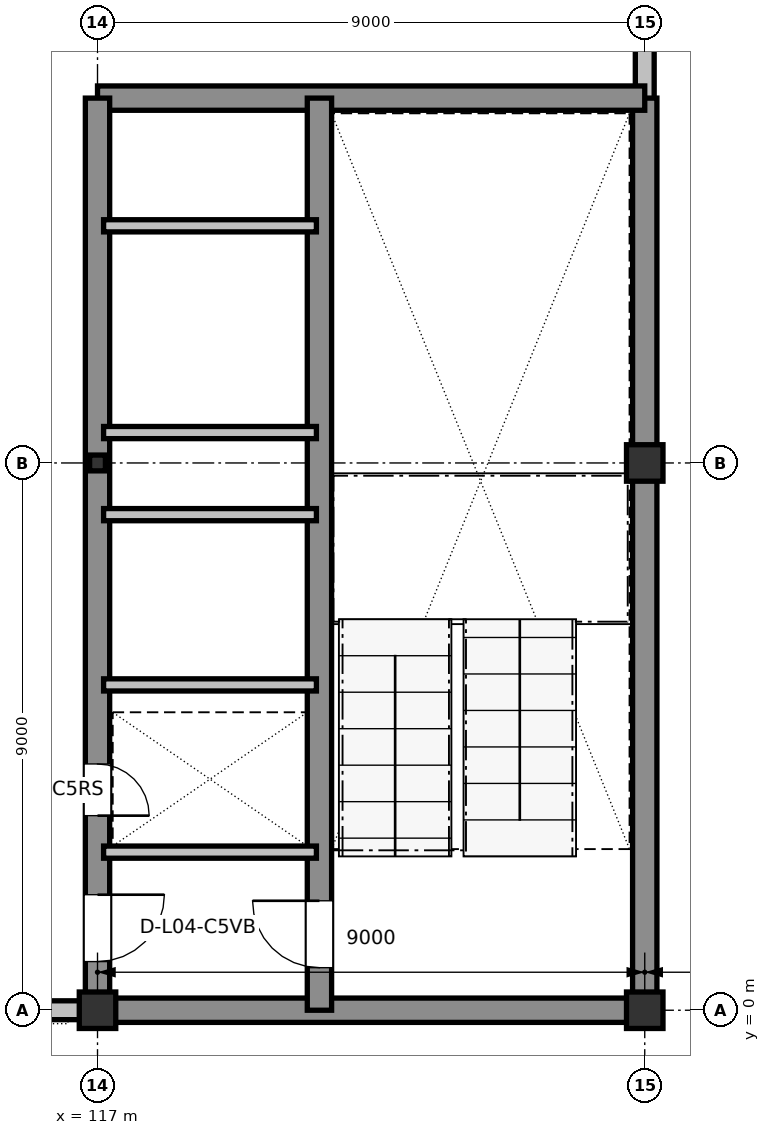
"""IFC4 building model, lengths in metres.
Left out: names, types, materials, properties, quantities, classifications, styles, units other than length and angle.
Written with IfcOpenShell. Run it as: python <this file> out.ifc"""

import sys

from ifc_helpers import new_model, si_unit, direction, frame, frame_2d, origin, origin_2d, place, context, subcontext, project, spatial, rectangle, i_section, extrude, element, fill, save


model = new_model("IFC4")
c1 = context("Model", 3, precision=1e-05, world=origin(), true_north=direction((0.0, 1.0)))
c2 = subcontext(c1, "Body", "Model", "MODEL_VIEW")
j1 = project(units=[si_unit("LENGTHUNIT", "METRE"), si_unit("PLANEANGLEUNIT", "RADIAN")], contexts=[c1])
p1 = place(None, origin())
s1 = spatial("IfcSite", under=j1, at=p1, CompositionType="ELEMENT")
p2 = place(p1, origin())
s2 = spatial("IfcBuilding", under=s1, at=p2, CompositionType="ELEMENT")
p3 = place(p2, frame((0.0, 0.0, 19.2)))
s3 = spatial("IfcBuildingStorey", under=s2, at=p3, CompositionType="ELEMENT", Elevation=19.2)
p4 = place(p3, frame((117.0, 0.0, 0.0), z_axis=(0.0, 0.0, 1.0), x_axis=(1.0, 0.0, 0.0)))
e1 = element("IfcColumn", 1, at=p4, inside=s3, PredefinedType="COLUMN", context=c2, shape_type="SweptSolid", body=[
    extrude(rectangle(XDim=0.6, YDim=0.6, at=origin_2d()), origin(), (0.0, 0.0, 1.0), 4.2),
])
p5 = place(p3, frame((117.0, 9.0, 0.0), z_axis=(0.0, 0.0, 1.0), x_axis=(1.0, 0.0, 0.0)))
e2 = element("IfcColumn", 2, at=p5, inside=s3, PredefinedType="COLUMN", context=c2, shape_type="SweptSolid", body=[
    extrude(i_section(OverallWidth=0.26, OverallDepth=0.26, WebThickness=0.01, FlangeThickness=0.018, at=origin_2d()), origin(), (0.0, 0.0, 1.0), 4.2),
])
for number, where, z_axis, x_axis in (
    (3, (126.0, 0.0, 0.0), (0.0, 0.0, 1.0), (1.0, 0.0, 0.0)),
    (4, (126.0, 9.0, 0.0), (0.0, 0.0, 1.0), (1.0, 0.0, 0.0)),
):
    element("IfcColumn", number, at=place(p3, frame(where, z_axis=z_axis, x_axis=x_axis)), inside=s3, PredefinedType="COLUMN", context=c2, shape_type="SweptSolid", body=[
        extrude(rectangle(XDim=0.6, YDim=0.6, at=origin_2d()), origin(), (0.0, 0.0, 1.0), 4.2),
    ])
p6 = place(p3, frame((108.285, 0.0, 0.0), z_axis=(0.0, 0.0, 1.0), x_axis=(1.0, 0.0, 0.0)))
e5 = element("IfcWall", 5, at=p6, inside=s3, PredefinedType="STANDARD", context=c2, shape_type="SweptSolid", body=[
    extrude(rectangle(XDim=8.43, YDim=0.31, at=frame_2d((4.215, 0.0))), origin(), (0.0, 0.0, 1.0), 3.635),
])
p7 = place(p6, frame((3.365, 0.0, 0.9)))
e6 = element("IfcOpeningElement", 6, at=p7, cuts=e5, PredefinedType="OPENING", context=c2, shape_type="SweptSolid", body=[
    extrude(rectangle(XDim=1.7, YDim=2.05, at=frame_2d((0.85, 1.025))), frame((0.0, 0.165, 0.0), z_axis=(0.0, -1.0, 0.0), x_axis=(1.0, 0.0, 0.0)), (0.0, 0.0, 1.0), 0.33),
])
p8 = place(p3, frame((126.0, 14.925, 0.0), z_axis=(0.0, 0.0, 1.0), x_axis=(0.0, 1.0, 0.0)))
e7 = element("IfcWall", 7, at=p8, inside=s3, PredefinedType="STANDARD", context=c2, shape_type="SweptSolid", body=[
    extrude(rectangle(XDim=2.79, YDim=0.31, at=frame_2d((1.395, 0.0))), origin(), (0.0, 0.0, 1.0), 3.655),
])
p9 = place(p3, frame((117.0, 0.0, 0.0), z_axis=(0.0, 0.0, 1.0), x_axis=(1.0, 0.0, 0.0)))
e8 = element("IfcWall", 8, at=p9, inside=s3, PredefinedType="SHEAR", context=c2, shape_type="SweptSolid", body=[
    extrude(rectangle(XDim=9.0, YDim=0.4, at=frame_2d((4.5, 0.0))), origin(), (0.0, 0.0, 1.0), 3.96),
])
p10 = place(p3, frame((126.0, 0.0, 0.0), z_axis=(0.0, 0.0, 1.0), x_axis=(0.0, 1.0, 0.0)))
e9 = element("IfcWall", 9, at=p10, inside=s3, PredefinedType="SHEAR", context=c2, shape_type="SweptSolid", body=[
    extrude(rectangle(XDim=15.0, YDim=0.4, at=frame_2d((7.5, 0.0))), origin(), (0.0, 0.0, 1.0), 3.96),
])
p11 = place(p3, frame((126.0, 15.0, 0.0), z_axis=(0.0, 0.0, 1.0), x_axis=(-1.0, 0.0, 0.0)))
e10 = element("IfcWall", 10, at=p11, inside=s3, PredefinedType="SHEAR", context=c2, shape_type="SweptSolid", body=[
    extrude(rectangle(XDim=9.0, YDim=0.4, at=frame_2d((4.5, 0.0))), origin(), (0.0, 0.0, 1.0), 3.96),
])
p12 = place(p3, frame((117.0, 15.0, 0.0), z_axis=(0.0, 0.0, 1.0), x_axis=(0.0, -1.0, 0.0)))
e11 = element("IfcWall", 11, at=p12, inside=s3, PredefinedType="SHEAR", context=c2, shape_type="SweptSolid", body=[
    extrude(rectangle(XDim=15.0, YDim=0.4, at=frame_2d((7.5, 0.0))), origin(), (0.0, 0.0, 1.0), 3.96),
])
p13 = place(p12, frame((13.1, 0.0, 0.0)))
e12 = element("IfcOpeningElement", 12, at=p13, cuts=e11, PredefinedType="OPENING", context=c2, shape_type="SweptSolid", body=[
    extrude(rectangle(XDim=1.1, YDim=2.16, at=frame_2d((0.55, 1.08))), frame((0.0, 0.21, 0.0), z_axis=(0.0, -1.0, 0.0), x_axis=(1.0, 0.0, 0.0)), (0.0, 0.0, 1.0), 0.42),
])
p14 = place(p12, frame((10.95, 0.0, 0.0)))
e13 = element("IfcOpeningElement", 13, at=p14, cuts=e11, PredefinedType="OPENING", context=c2, shape_type="SweptSolid", body=[
    extrude(rectangle(XDim=0.85, YDim=2.1, at=frame_2d((0.425, 1.05))), frame((0.0, 0.21, 0.0), z_axis=(0.0, -1.0, 0.0), x_axis=(1.0, 0.0, 0.0)), (0.0, 0.0, 1.0), 0.42),
])
p15 = place(p3, frame((120.65, 0.0, 0.0), z_axis=(0.0, 0.0, 1.0), x_axis=(0.0, 1.0, 0.0)))
e14 = element("IfcWall", 14, at=p15, inside=s3, PredefinedType="SHEAR", context=c2, shape_type="SweptSolid", body=[
    extrude(rectangle(XDim=15.0, YDim=0.4, at=frame_2d((7.5, 0.0))), origin(), (0.0, 0.0, 1.0), 3.96),
])
p16 = place(p15, frame((0.7, 0.0, 0.0)))
e15 = element("IfcOpeningElement", 15, at=p16, cuts=e14, PredefinedType="OPENING", context=c2, shape_type="SweptSolid", body=[
    extrude(rectangle(XDim=1.1, YDim=2.16, at=frame_2d((0.55, 1.08))), frame((0.0, 0.21, 0.0), z_axis=(0.0, -1.0, 0.0), x_axis=(1.0, 0.0, 0.0)), (0.0, 0.0, 1.0), 0.42),
])
for number, where, z_axis, x_axis in (
    (16, (117.1, 2.6, 0.0), (0.0, 0.0, 1.0), (1.0, 0.0, 0.0)),
    (17, (117.1, 5.35, 0.0), (0.0, 0.0, 1.0), (1.0, 0.0, 0.0)),
    (18, (117.1, 8.15, 0.0), (0.0, 0.0, 1.0), (1.0, 0.0, 0.0)),
    (19, (117.1, 9.5, 0.0), (0.0, 0.0, 1.0), (1.0, 0.0, 0.0)),
    (20, (117.1, 12.9, 0.0), (0.0, 0.0, 1.0), (1.0, 0.0, 0.0)),
):
    element("IfcWall", number, at=place(p3, frame(where, z_axis=z_axis, x_axis=x_axis)), inside=s3, PredefinedType="PARTITIONING", context=c2, shape_type="SweptSolid", body=[
        extrude(rectangle(XDim=3.5, YDim=0.2, at=frame_2d((1.75, 0.0))), origin(), (0.0, 0.0, 1.0), 3.96),
    ])
p17 = place(p16, origin())
e21 = element("IfcDoor", 21, at=p17, inside=s3, OperationType="SINGLE_SWING_RIGHT", PredefinedType="DOOR", context=c2, shape_type="SweptSolid", body=[
    extrude(rectangle(XDim=1.1, YDim=2.16, at=frame_2d((0.55, 1.08))), frame((0.0, 0.025, 0.0), z_axis=(0.0, -1.0, 0.0), x_axis=(1.0, 0.0, 0.0)), (0.0, 0.0, 1.0), 0.05),
])
fill(e15, e21)
p18 = place(p13, origin())
e22 = element("IfcDoor", 22, at=p18, inside=s3, OperationType="SINGLE_SWING_LEFT", PredefinedType="DOOR", context=c2, shape_type="SweptSolid", body=[
    extrude(rectangle(XDim=1.1, YDim=2.16, at=frame_2d((0.55, 1.08))), frame((0.0, 0.025, 0.0), z_axis=(0.0, -1.0, 0.0), x_axis=(1.0, 0.0, 0.0)), (0.0, 0.0, 1.0), 0.05),
])
fill(e12, e22)
p19 = place(p14, origin())
e23 = element("IfcDoor", 23, at=p19, inside=s3, OperationType="SINGLE_SWING_RIGHT", PredefinedType="DOOR", context=c2, shape_type="SweptSolid", body=[
    extrude(rectangle(XDim=0.85, YDim=2.1, at=frame_2d((0.425, 1.05))), frame((0.0, 0.025, 0.0), z_axis=(0.0, -1.0, 0.0), x_axis=(1.0, 0.0, 0.0)), (0.0, 0.0, 1.0), 0.05),
])
fill(e13, e23)
save(model, sys.argv[1])
